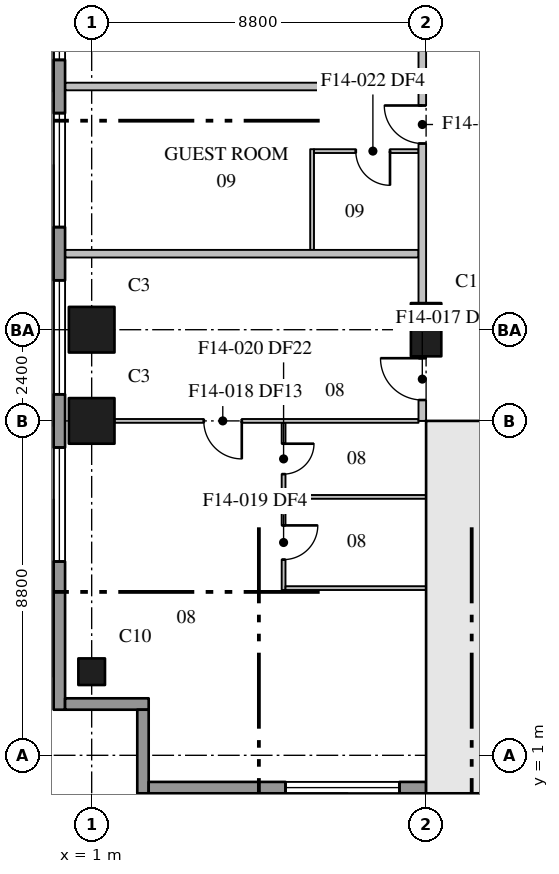
"""IFC4 building model, lengths in metres.
Left out: names, types, materials, properties, quantities, classifications, styles, units other than length and angle.
Written with IfcOpenShell. Run it as: python <this file> out.ifc"""

import sys

from ifc_helpers import new_model, si_unit, direction, frame, frame_2d, origin, origin_2d, place, context, subcontext, project, spatial, rectangle, extrude, element, fill, save


model = new_model("IFC4")
c1 = context("Model", 3, precision=1e-05, world=origin(), true_north=direction((0.0, 1.0)))
c2 = subcontext(c1, "Body", "Model", "MODEL_VIEW")
j1 = project(units=[si_unit("LENGTHUNIT", "METRE"), si_unit("PLANEANGLEUNIT", "RADIAN")], contexts=[c1])
p1 = place(None, origin())
s1 = spatial("IfcSite", under=j1, at=p1, CompositionType="ELEMENT")
p2 = place(p1, origin())
s2 = spatial("IfcBuilding", under=s1, at=p2, CompositionType="ELEMENT")
p3 = place(p2, frame((0.0, 0.0, 129.6)))
s3 = spatial("IfcBuildingStorey", under=s2, at=p3, CompositionType="ELEMENT", Elevation=129.6)
p4 = place(p3, frame((1.0, 3.2, 0.0), z_axis=(0.0, 0.0, 1.0), x_axis=(1.0, 0.0, 0.0)))
e1 = element("IfcColumn", 1, at=p4, inside=s3, PredefinedType="COLUMN", context=c2, shape_type="SweptSolid", body=[
    extrude(rectangle(XDim=0.7, YDim=0.7, at=origin_2d()), origin(), (0.0, 0.0, 1.0), 3.7),
])
for number, where, z_axis, x_axis in (
    (2, (1.0, 9.8, 0.0), (0.0, 0.0, 1.0), (1.0, 0.0, 0.0)),
    (3, (1.0, 12.2, 0.0), (0.0, 0.0, 1.0), (1.0, 0.0, 0.0)),
):
    element("IfcColumn", number, at=place(p3, frame(where, z_axis=z_axis, x_axis=x_axis)), inside=s3, PredefinedType="COLUMN", context=c2, shape_type="SweptSolid", body=[
        extrude(rectangle(XDim=1.2, YDim=1.2, at=origin_2d()), origin(), (0.0, 0.0, 1.0), 3.7),
    ])
p5 = place(p3, frame((9.8, 12.2, 0.0), z_axis=(0.0, 0.0, 1.0), x_axis=(0.0, 1.0, 0.0)))
e4 = element("IfcColumn", 4, at=p5, inside=s3, PredefinedType="COLUMN", context=c2, shape_type="SweptSolid", body=[
    extrude(rectangle(XDim=1.4, YDim=0.8, at=origin_2d()), origin(), (0.0, 0.0, 1.0), 3.7),
])
p6 = place(p3, frame((9.8, 0.8, 0.0), z_axis=(0.0, 0.0, 1.0), x_axis=(1.0, 0.0, 0.0)))
e5 = element("IfcWall", 5, at=p6, inside=s3, PredefinedType="SHEAR", context=c2, shape_type="SweptSolid", body=[
    extrude(rectangle(XDim=35.2, YDim=0.8, at=frame_2d((17.6, 0.0))), origin(), (0.0, 0.0, 1.0), 3.7),
])
p7 = place(p3, frame((10.6, 1.2, 0.0), z_axis=(0.0, 0.0, 1.0), x_axis=(0.0, 1.0, 0.0)))
e6 = element("IfcWall", 6, at=p7, inside=s3, PredefinedType="SHEAR", context=c2, shape_type="SweptSolid", body=[
    extrude(rectangle(XDim=8.6, YDim=0.8, at=frame_2d((4.3, 0.0))), origin(), (0.0, 0.0, 1.0), 3.7),
])
p8 = place(p3, frame((9.8, 9.6, 0.0), z_axis=(0.0, 0.0, 1.0), x_axis=(1.0, 0.0, 0.0)))
e7 = element("IfcWall", 7, at=p8, inside=s3, PredefinedType="SHEAR", context=c2, shape_type="SweptSolid", body=[
    extrude(rectangle(XDim=4.3, YDim=0.4, at=frame_2d((2.15, 0.0))), origin(), (0.0, 0.0, 1.0), 3.7),
])
p9 = place(p8, frame((2.05, 0.0, 0.0)))
e8 = element("IfcOpeningElement", 8, at=p9, cuts=e7, PredefinedType="OPENING", context=c2, shape_type="SweptSolid", body=[
    extrude(rectangle(XDim=1.2, YDim=2.1, at=frame_2d((0.6, 1.05))), frame((0.0, 0.21, 0.0), z_axis=(0.0, -1.0, 0.0), x_axis=(1.0, 0.0, 0.0)), (0.0, 0.0, 1.0), 0.42),
])
p10 = place(p3, frame((0.15, 78.7, 0.0), z_axis=(0.0, 0.0, 1.0), x_axis=(0.0, -1.0, 0.0)))
e9 = element("IfcWall", 9, at=p10, inside=s3, PredefinedType="STANDARD", context=c2, shape_type="SweptSolid", body=[
    extrude(rectangle(XDim=76.5, YDim=0.3, at=frame_2d((38.25, 0.0))), origin(), (0.0, 0.0, 1.0), 3.25),
])
p11 = place(p10, frame((3.6, 0.0, 0.75)))
e10 = element("IfcOpeningElement", 10, at=p11, cuts=e9, PredefinedType="OPENING", context=c2, shape_type="SweptSolid", body=[
    extrude(rectangle(XDim=3.0, YDim=2.3, at=frame_2d((1.5, 1.15))), frame((0.0, 0.16, 0.0), z_axis=(0.0, -1.0, 0.0), x_axis=(1.0, 0.0, 0.0)), (0.0, 0.0, 1.0), 0.32),
])
p12 = place(p10, frame((8.0, 0.0, 0.75)))
e11 = element("IfcOpeningElement", 11, at=p12, cuts=e9, PredefinedType="OPENING", context=c2, shape_type="SweptSolid", body=[
    extrude(rectangle(XDim=3.0, YDim=2.3, at=frame_2d((1.5, 1.15))), frame((0.0, 0.16, 0.0), z_axis=(0.0, -1.0, 0.0), x_axis=(1.0, 0.0, 0.0)), (0.0, 0.0, 1.0), 0.32),
])
p13 = place(p10, frame((12.4, 0.0, 0.75)))
e12 = element("IfcOpeningElement", 12, at=p13, cuts=e9, PredefinedType="OPENING", context=c2, shape_type="SweptSolid", body=[
    extrude(rectangle(XDim=3.0, YDim=2.3, at=frame_2d((1.5, 1.15))), frame((0.0, 0.16, 0.0), z_axis=(0.0, -1.0, 0.0), x_axis=(1.0, 0.0, 0.0)), (0.0, 0.0, 1.0), 0.32),
])
p14 = place(p10, frame((16.8, 0.0, 0.75)))
e13 = element("IfcOpeningElement", 13, at=p14, cuts=e9, PredefinedType="OPENING", context=c2, shape_type="SweptSolid", body=[
    extrude(rectangle(XDim=3.0, YDim=2.3, at=frame_2d((1.5, 1.15))), frame((0.0, 0.16, 0.0), z_axis=(0.0, -1.0, 0.0), x_axis=(1.0, 0.0, 0.0)), (0.0, 0.0, 1.0), 0.32),
])
p15 = place(p10, frame((21.2, 0.0, 0.75)))
e14 = element("IfcOpeningElement", 14, at=p15, cuts=e9, PredefinedType="OPENING", context=c2, shape_type="SweptSolid", body=[
    extrude(rectangle(XDim=3.0, YDim=2.3, at=frame_2d((1.5, 1.15))), frame((0.0, 0.16, 0.0), z_axis=(0.0, -1.0, 0.0), x_axis=(1.0, 0.0, 0.0)), (0.0, 0.0, 1.0), 0.32),
])
p16 = place(p10, frame((25.6, 0.0, 0.75)))
e15 = element("IfcOpeningElement", 15, at=p16, cuts=e9, PredefinedType="OPENING", context=c2, shape_type="SweptSolid", body=[
    extrude(rectangle(XDim=3.0, YDim=2.3, at=frame_2d((1.5, 1.15))), frame((0.0, 0.16, 0.0), z_axis=(0.0, -1.0, 0.0), x_axis=(1.0, 0.0, 0.0)), (0.0, 0.0, 1.0), 0.32),
])
p17 = place(p10, frame((30.0, 0.0, 0.75)))
e16 = element("IfcOpeningElement", 16, at=p17, cuts=e9, PredefinedType="OPENING", context=c2, shape_type="SweptSolid", body=[
    extrude(rectangle(XDim=3.0, YDim=2.3, at=frame_2d((1.5, 1.15))), frame((0.0, 0.16, 0.0), z_axis=(0.0, -1.0, 0.0), x_axis=(1.0, 0.0, 0.0)), (0.0, 0.0, 1.0), 0.32),
])
p18 = place(p10, frame((34.4, 0.0, 0.75)))
e17 = element("IfcOpeningElement", 17, at=p18, cuts=e9, PredefinedType="OPENING", context=c2, shape_type="SweptSolid", body=[
    extrude(rectangle(XDim=3.0, YDim=2.3, at=frame_2d((1.5, 1.15))), frame((0.0, 0.16, 0.0), z_axis=(0.0, -1.0, 0.0), x_axis=(1.0, 0.0, 0.0)), (0.0, 0.0, 1.0), 0.32),
])
p19 = place(p10, frame((38.8, 0.0, 0.75)))
e18 = element("IfcOpeningElement", 18, at=p19, cuts=e9, PredefinedType="OPENING", context=c2, shape_type="SweptSolid", body=[
    extrude(rectangle(XDim=3.0, YDim=2.3, at=frame_2d((1.5, 1.15))), frame((0.0, 0.16, 0.0), z_axis=(0.0, -1.0, 0.0), x_axis=(1.0, 0.0, 0.0)), (0.0, 0.0, 1.0), 0.32),
])
p20 = place(p10, frame((43.2, 0.0, 0.75)))
e19 = element("IfcOpeningElement", 19, at=p20, cuts=e9, PredefinedType="OPENING", context=c2, shape_type="SweptSolid", body=[
    extrude(rectangle(XDim=3.0, YDim=2.3, at=frame_2d((1.5, 1.15))), frame((0.0, 0.16, 0.0), z_axis=(0.0, -1.0, 0.0), x_axis=(1.0, 0.0, 0.0)), (0.0, 0.0, 1.0), 0.32),
])
p21 = place(p10, frame((47.6, 0.0, 0.75)))
e20 = element("IfcOpeningElement", 20, at=p21, cuts=e9, PredefinedType="OPENING", context=c2, shape_type="SweptSolid", body=[
    extrude(rectangle(XDim=3.0, YDim=2.3, at=frame_2d((1.5, 1.15))), frame((0.0, 0.16, 0.0), z_axis=(0.0, -1.0, 0.0), x_axis=(1.0, 0.0, 0.0)), (0.0, 0.0, 1.0), 0.32),
])
p22 = place(p10, frame((52.0, 0.0, 0.75)))
e21 = element("IfcOpeningElement", 21, at=p22, cuts=e9, PredefinedType="OPENING", context=c2, shape_type="SweptSolid", body=[
    extrude(rectangle(XDim=3.0, YDim=2.3, at=frame_2d((1.5, 1.15))), frame((0.0, 0.16, 0.0), z_axis=(0.0, -1.0, 0.0), x_axis=(1.0, 0.0, 0.0)), (0.0, 0.0, 1.0), 0.32),
])
p23 = place(p10, frame((56.4, 0.0, 0.75)))
e22 = element("IfcOpeningElement", 22, at=p23, cuts=e9, PredefinedType="OPENING", context=c2, shape_type="SweptSolid", body=[
    extrude(rectangle(XDim=3.0, YDim=2.3, at=frame_2d((1.5, 1.15))), frame((0.0, 0.16, 0.0), z_axis=(0.0, -1.0, 0.0), x_axis=(1.0, 0.0, 0.0)), (0.0, 0.0, 1.0), 0.32),
])
p24 = place(p10, frame((60.8, 0.0, 0.75)))
e23 = element("IfcOpeningElement", 23, at=p24, cuts=e9, PredefinedType="OPENING", context=c2, shape_type="SweptSolid", body=[
    extrude(rectangle(XDim=3.0, YDim=2.3, at=frame_2d((1.5, 1.15))), frame((0.0, 0.16, 0.0), z_axis=(0.0, -1.0, 0.0), x_axis=(1.0, 0.0, 0.0)), (0.0, 0.0, 1.0), 0.32),
])
p25 = place(p10, frame((65.2, 0.0, 0.75)))
e24 = element("IfcOpeningElement", 24, at=p25, cuts=e9, PredefinedType="OPENING", context=c2, shape_type="SweptSolid", body=[
    extrude(rectangle(XDim=3.0, YDim=2.3, at=frame_2d((1.5, 1.15))), frame((0.0, 0.16, 0.0), z_axis=(0.0, -1.0, 0.0), x_axis=(1.0, 0.0, 0.0)), (0.0, 0.0, 1.0), 0.32),
])
p26 = place(p10, frame((69.6, 0.0, 0.75)))
e25 = element("IfcOpeningElement", 25, at=p26, cuts=e9, PredefinedType="OPENING", context=c2, shape_type="SweptSolid", body=[
    extrude(rectangle(XDim=3.0, YDim=2.3, at=frame_2d((1.5, 1.15))), frame((0.0, 0.16, 0.0), z_axis=(0.0, -1.0, 0.0), x_axis=(1.0, 0.0, 0.0)), (0.0, 0.0, 1.0), 0.32),
])
for number, where, z_axis, x_axis in (
    (26, (0.3, 2.35, 0.0), (0.0, 0.0, 1.0), (1.0, 0.0, 0.0)),
    (27, (2.35, 2.2, 0.0), (0.0, 0.0, 1.0), (0.0, -1.0, 0.0)),
):
    element("IfcWall", number, at=place(p3, frame(where, z_axis=z_axis, x_axis=x_axis)), inside=s3, PredefinedType="STANDARD", context=c2, shape_type="SweptSolid", body=[
        extrude(rectangle(XDim=2.2, YDim=0.3, at=frame_2d((1.1, 0.0))), origin(), (0.0, 0.0, 1.0), 3.25),
    ])
p27 = place(p3, frame((2.5, 0.15, 0.0), z_axis=(0.0, 0.0, 1.0), x_axis=(1.0, 0.0, 0.0)))
e28 = element("IfcWall", 28, at=p27, inside=s3, PredefinedType="STANDARD", context=c2, shape_type="SweptSolid", body=[
    extrude(rectangle(XDim=7.3, YDim=0.3, at=frame_2d((3.65, 0.0))), origin(), (0.0, 0.0, 1.0), 3.25),
])
p28 = place(p27, frame((3.6, 0.0, 0.75)))
e29 = element("IfcOpeningElement", 29, at=p28, cuts=e28, PredefinedType="OPENING", context=c2, shape_type="SweptSolid", body=[
    extrude(rectangle(XDim=3.0, YDim=2.3, at=frame_2d((1.5, 1.15))), frame((0.0, 0.16, 0.0), z_axis=(0.0, -1.0, 0.0), x_axis=(1.0, 0.0, 0.0)), (0.0, 0.0, 1.0), 0.32),
])
p29 = place(p3, frame((9.7, 9.8, 0.0), z_axis=(0.0, 0.0, 1.0), x_axis=(0.0, 1.0, 0.0)))
e30 = element("IfcWall", 30, at=p29, inside=s3, PredefinedType="PARTITIONING", context=c2, shape_type="SweptSolid", body=[
    extrude(rectangle(XDim=1.7, YDim=0.2, at=frame_2d((0.85, 0.0))), origin(), (0.0, 0.0, 1.0), 3.25),
])
p30 = place(p29, frame((0.55, 0.0, 0.0)))
e31 = element("IfcOpeningElement", 31, at=p30, cuts=e30, PredefinedType="OPENING", context=c2, shape_type="SweptSolid", body=[
    extrude(rectangle(XDim=1.1, YDim=2.1, at=frame_2d((0.55, 1.05))), frame((0.0, 0.11, 0.0), z_axis=(0.0, -1.0, 0.0), x_axis=(1.0, 0.0, 0.0)), (0.0, 0.0, 1.0), 0.22),
])
p31 = place(p3, frame((9.7, 12.9, 0.0), z_axis=(0.0, 0.0, 1.0), x_axis=(0.0, 1.0, 0.0)))
e32 = element("IfcWall", 32, at=p31, inside=s3, PredefinedType="PARTITIONING", context=c2, shape_type="SweptSolid", body=[
    extrude(rectangle(XDim=7.5, YDim=0.2, at=frame_2d((3.75, 0.0))), origin(), (0.0, 0.0, 1.0), 3.25),
])
p32 = place(p31, frame((4.2, 0.0, 0.0)))
e33 = element("IfcOpeningElement", 33, at=p32, cuts=e32, PredefinedType="OPENING", context=c2, shape_type="SweptSolid", body=[
    extrude(rectangle(XDim=1.0, YDim=2.1, at=frame_2d((0.5, 1.05))), frame((0.0, 0.11, 0.0), z_axis=(0.0, -1.0, 0.0), x_axis=(1.0, 0.0, 0.0)), (0.0, 0.0, 1.0), 0.22),
])
for number, where, z_axis, x_axis in (
    (34, (0.31, 14.2, 0.0), (0.0, 0.0, 1.0), (1.0, 0.0, 0.0)),
    (35, (0.31, 18.6, 0.0), (0.0, 0.0, 1.0), (1.0, 0.0, 0.0)),
):
    element("IfcWall", number, at=place(p3, frame(where, z_axis=z_axis, x_axis=x_axis)), inside=s3, PredefinedType="PARTITIONING", context=c2, shape_type="SweptSolid", body=[
        extrude(rectangle(XDim=9.29, YDim=0.2, at=frame_2d((4.645, 0.0))), origin(), (0.0, 0.0, 1.0), 3.25),
    ])
p33 = place(p3, frame((6.05, 9.75, 0.0), z_axis=(0.0, 0.0, 1.0), x_axis=(0.0, -1.0, 0.0)))
e36 = element("IfcWall", 36, at=p33, inside=s3, PredefinedType="PARTITIONING", context=c2, shape_type="SweptSolid", body=[
    extrude(rectangle(XDim=4.4, YDim=0.1, at=frame_2d((2.2, 0.0))), origin(), (0.0, 0.0, 1.0), 3.25),
])
p34 = place(p33, frame((2.7, 0.0, 0.0)))
e37 = element("IfcOpeningElement", 37, at=p34, cuts=e36, PredefinedType="OPENING", context=c2, shape_type="SweptSolid", body=[
    extrude(rectangle(XDim=0.9, YDim=2.1, at=frame_2d((0.45, 1.05))), frame((0.0, 0.06, 0.0), z_axis=(0.0, -1.0, 0.0), x_axis=(1.0, 0.0, 0.0)), (0.0, 0.0, 1.0), 0.12),
])
p35 = place(p33, frame((0.55, 0.0, 0.0)))
e38 = element("IfcOpeningElement", 38, at=p35, cuts=e36, PredefinedType="OPENING", context=c2, shape_type="SweptSolid", body=[
    extrude(rectangle(XDim=0.8, YDim=2.1, at=frame_2d((0.4, 1.05))), frame((0.0, 0.06, 0.0), z_axis=(0.0, -1.0, 0.0), x_axis=(1.0, 0.0, 0.0)), (0.0, 0.0, 1.0), 0.12),
])
p36 = place(p3, frame((9.6, 9.8, 0.0), z_axis=(0.0, 0.0, 1.0), x_axis=(-1.0, 0.0, 0.0)))
e39 = element("IfcWall", 39, at=p36, inside=s3, PredefinedType="PARTITIONING", context=c2, shape_type="SweptSolid", body=[
    extrude(rectangle(XDim=8.0, YDim=0.1, at=frame_2d((4.0, 0.0))), origin(), (0.0, 0.0, 1.0), 3.25),
])
p37 = place(p36, frame((4.65, 0.0, 0.0)))
e40 = element("IfcOpeningElement", 40, at=p37, cuts=e39, PredefinedType="OPENING", context=c2, shape_type="SweptSolid", body=[
    extrude(rectangle(XDim=1.0, YDim=2.1, at=frame_2d((0.5, 1.05))), frame((0.0, 0.06, 0.0), z_axis=(0.0, -1.0, 0.0), x_axis=(1.0, 0.0, 0.0)), (0.0, 0.0, 1.0), 0.12),
])
for number, where, z_axis, x_axis in (
    (41, (6.1, 5.4, 0.0), (0.0, 0.0, 1.0), (1.0, 0.0, 0.0)),
    (42, (6.1, 7.8, 0.0), (0.0, 0.0, 1.0), (1.0, 0.0, 0.0)),
):
    element("IfcWall", number, at=place(p3, frame(where, z_axis=z_axis, x_axis=x_axis)), inside=s3, PredefinedType="PARTITIONING", context=c2, shape_type="SweptSolid", body=[
        extrude(rectangle(XDim=3.7, YDim=0.1, at=frame_2d((1.85, 0.0))), origin(), (0.0, 0.0, 1.0), 3.25),
    ])
p38 = place(p3, frame((6.8, 14.3, 0.0), z_axis=(0.0, 0.0, 1.0), x_axis=(0.0, 1.0, 0.0)))
e43 = element("IfcWall", 43, at=p38, inside=s3, PredefinedType="PARTITIONING", context=c2, shape_type="SweptSolid", body=[
    extrude(rectangle(XDim=2.65, YDim=0.1, at=frame_2d((1.325, 0.0))), origin(), (0.0, 0.0, 1.0), 3.25),
])
p39 = place(p3, frame((9.6, 16.9, 0.0), z_axis=(0.0, 0.0, 1.0), x_axis=(-1.0, 0.0, 0.0)))
e44 = element("IfcWall", 44, at=p39, inside=s3, PredefinedType="PARTITIONING", context=c2, shape_type="SweptSolid", body=[
    extrude(rectangle(XDim=2.75, YDim=0.1, at=frame_2d((1.375, 0.0))), origin(), (0.0, 0.0, 1.0), 3.25),
])
p40 = place(p39, frame((0.75, 0.0, 0.0)))
e45 = element("IfcOpeningElement", 45, at=p40, cuts=e44, PredefinedType="OPENING", context=c2, shape_type="SweptSolid", body=[
    extrude(rectangle(XDim=0.9, YDim=2.1, at=frame_2d((0.45, 1.05))), frame((0.0, 0.06, 0.0), z_axis=(0.0, -1.0, 0.0), x_axis=(1.0, 0.0, 0.0)), (0.0, 0.0, 1.0), 0.12),
])
p41 = place(p23, origin())
e46 = element("IfcWindow", 46, at=p41, inside=s3, PartitioningType="SINGLE_PANEL", PredefinedType="WINDOW", context=c2, shape_type="SweptSolid", body=[
    extrude(rectangle(XDim=3.0, YDim=2.3, at=frame_2d((1.5, 1.15))), frame((0.0, 0.03, 0.0), z_axis=(0.0, -1.0, 0.0), x_axis=(1.0, 0.0, 0.0)), (0.0, 0.0, 1.0), 0.06),
])
fill(e22, e46)
p42 = place(p24, origin())
e47 = element("IfcWindow", 47, at=p42, inside=s3, PartitioningType="SINGLE_PANEL", PredefinedType="WINDOW", context=c2, shape_type="SweptSolid", body=[
    extrude(rectangle(XDim=3.0, YDim=2.3, at=frame_2d((1.5, 1.15))), frame((0.0, 0.03, 0.0), z_axis=(0.0, -1.0, 0.0), x_axis=(1.0, 0.0, 0.0)), (0.0, 0.0, 1.0), 0.06),
])
fill(e23, e47)
p43 = place(p25, origin())
e48 = element("IfcWindow", 48, at=p43, inside=s3, PartitioningType="SINGLE_PANEL", PredefinedType="WINDOW", context=c2, shape_type="SweptSolid", body=[
    extrude(rectangle(XDim=3.0, YDim=2.3, at=frame_2d((1.5, 1.15))), frame((0.0, 0.03, 0.0), z_axis=(0.0, -1.0, 0.0), x_axis=(1.0, 0.0, 0.0)), (0.0, 0.0, 1.0), 0.06),
])
fill(e24, e48)
p44 = place(p26, origin())
e49 = element("IfcWindow", 49, at=p44, inside=s3, PartitioningType="SINGLE_PANEL", PredefinedType="WINDOW", context=c2, shape_type="SweptSolid", body=[
    extrude(rectangle(XDim=3.0, YDim=2.3, at=frame_2d((1.5, 1.15))), frame((0.0, 0.03, 0.0), z_axis=(0.0, -1.0, 0.0), x_axis=(1.0, 0.0, 0.0)), (0.0, 0.0, 1.0), 0.06),
])
fill(e25, e49)
p45 = place(p28, origin())
e50 = element("IfcWindow", 50, at=p45, inside=s3, PartitioningType="SINGLE_PANEL", PredefinedType="WINDOW", context=c2, shape_type="SweptSolid", body=[
    extrude(rectangle(XDim=3.0, YDim=2.3, at=frame_2d((1.5, 1.15))), frame((0.0, 0.03, 0.0), z_axis=(0.0, -1.0, 0.0), x_axis=(1.0, 0.0, 0.0)), (0.0, 0.0, 1.0), 0.06),
])
fill(e29, e50)
p46 = place(p30, origin())
e51 = element("IfcDoor", 51, at=p46, inside=s3, OperationType="SINGLE_SWING_RIGHT", PredefinedType="DOOR", context=c2, shape_type="SweptSolid", body=[
    extrude(rectangle(XDim=1.1, YDim=2.1, at=frame_2d((0.55, 1.05))), frame((0.0, 0.025, 0.0), z_axis=(0.0, -1.0, 0.0), x_axis=(1.0, 0.0, 0.0)), (0.0, 0.0, 1.0), 0.05),
])
fill(e31, e51)
p47 = place(p37, origin())
e52 = element("IfcDoor", 52, at=p47, inside=s3, OperationType="SINGLE_SWING_LEFT", PredefinedType="DOOR", context=c2, shape_type="SweptSolid", body=[
    extrude(rectangle(XDim=1.0, YDim=2.1, at=frame_2d((0.5, 1.05))), frame((0.0, 0.025, 0.0), z_axis=(0.0, -1.0, 0.0), x_axis=(1.0, 0.0, 0.0)), (0.0, 0.0, 1.0), 0.05),
])
fill(e40, e52)
p48 = place(p34, origin())
e53 = element("IfcDoor", 53, at=p48, inside=s3, OperationType="SINGLE_SWING_LEFT", PredefinedType="DOOR", context=c2, shape_type="SweptSolid", body=[
    extrude(rectangle(XDim=0.9, YDim=2.1, at=frame_2d((0.45, 1.05))), frame((0.0, 0.025, 0.0), z_axis=(0.0, -1.0, 0.0), x_axis=(1.0, 0.0, 0.0)), (0.0, 0.0, 1.0), 0.05),
])
fill(e37, e53)
p49 = place(p35, origin())
e54 = element("IfcDoor", 54, at=p49, inside=s3, OperationType="SINGLE_SWING_LEFT", PredefinedType="DOOR", context=c2, shape_type="SweptSolid", body=[
    extrude(rectangle(XDim=0.8, YDim=2.1, at=frame_2d((0.4, 1.05))), frame((0.0, 0.025, 0.0), z_axis=(0.0, -1.0, 0.0), x_axis=(1.0, 0.0, 0.0)), (0.0, 0.0, 1.0), 0.05),
])
fill(e38, e54)
p50 = place(p32, origin())
e55 = element("IfcDoor", 55, at=p50, inside=s3, OperationType="SINGLE_SWING_RIGHT", PredefinedType="DOOR", context=c2, shape_type="SweptSolid", body=[
    extrude(rectangle(XDim=1.0, YDim=2.1, at=frame_2d((0.5, 1.05))), frame((0.0, 0.025, 0.0), z_axis=(0.0, -1.0, 0.0), x_axis=(1.0, 0.0, 0.0)), (0.0, 0.0, 1.0), 0.05),
])
fill(e33, e55)
p51 = place(p40, origin())
e56 = element("IfcDoor", 56, at=p51, inside=s3, OperationType="SINGLE_SWING_LEFT", PredefinedType="DOOR", context=c2, shape_type="SweptSolid", body=[
    extrude(rectangle(XDim=0.9, YDim=2.1, at=frame_2d((0.45, 1.05))), frame((0.0, 0.025, 0.0), z_axis=(0.0, -1.0, 0.0), x_axis=(1.0, 0.0, 0.0)), (0.0, 0.0, 1.0), 0.05),
])
fill(e45, e56)
save(model, sys.argv[1])
